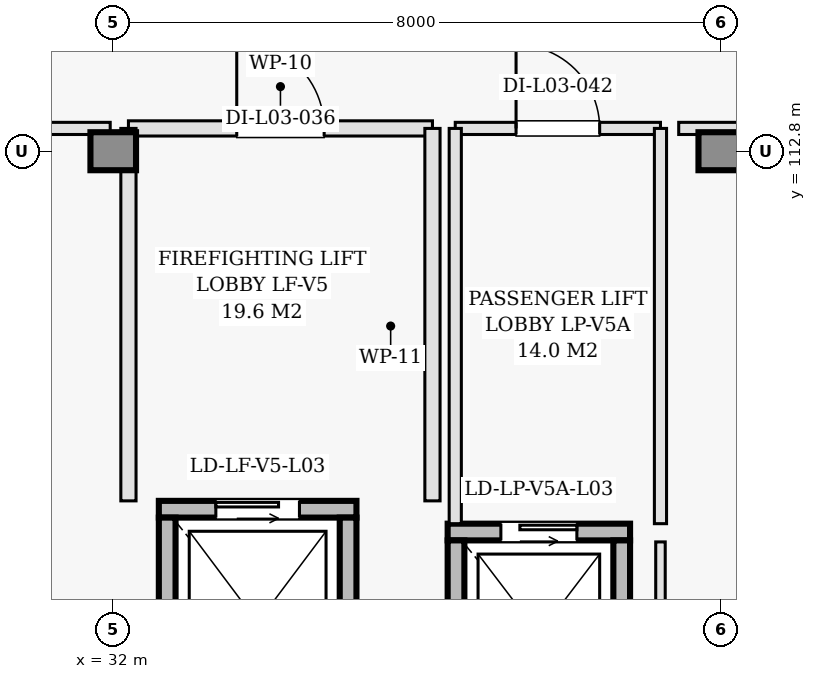
"""IFC4 building model, lengths in metres.
Left out: names, types, materials, properties, quantities, classifications, styles, units other than length and angle.
Written with IfcOpenShell. Run it as: python <this file> out.ifc"""

import sys

from ifc_helpers import new_model, si_unit, direction, frame, frame_2d, origin, origin_2d, place, context, subcontext, project, spatial, rectangle, extrude, element, fill, save


model = new_model("IFC4")
c1 = context("Model", 3, precision=1e-05, world=origin(), true_north=direction((0.0, 1.0)))
c2 = subcontext(c1, "Body", "Model", "MODEL_VIEW")
j1 = project(units=[si_unit("LENGTHUNIT", "METRE"), si_unit("PLANEANGLEUNIT", "RADIAN")], contexts=[c1])
p1 = place(None, origin())
s1 = spatial("IfcSite", under=j1, at=p1, CompositionType="ELEMENT")
p2 = place(p1, origin())
s2 = spatial("IfcBuilding", under=s1, at=p2, CompositionType="ELEMENT")
p3 = place(p2, frame((0.0, 0.0, 13.8)))
s3 = spatial("IfcBuildingStorey", under=s2, at=p3, CompositionType="ELEMENT", Elevation=13.8)
for number, where, z_axis, x_axis in (
    (1, (32.0, 112.8, 0.0), (0.0, 0.0, 1.0), (1.0, 0.0, 0.0)),
    (2, (40.0, 112.8, 0.0), (0.0, 0.0, 1.0), (1.0, 0.0, 0.0)),
):
    element("IfcColumn", number, at=place(p3, frame(where, z_axis=z_axis, x_axis=x_axis)), inside=s3, PredefinedType="COLUMN", context=c2, shape_type="SweptSolid", body=[
        extrude(rectangle(XDim=0.5, YDim=0.5, at=origin_2d()), origin(), (0.0, 0.0, 1.0), 4.2),
    ])
p4 = place(p3, frame((32.6, 108.09, 0.0), z_axis=(0.0, 0.0, 1.0), x_axis=(1.0, 0.0, 0.0)))
e3 = element("IfcWall", 3, at=p4, inside=s3, PredefinedType="SHEAR", context=c2, shape_type="SweptSolid", body=[
    extrude(rectangle(XDim=2.6, YDim=0.22, at=frame_2d((1.3, 0.0))), origin(), (0.0, 0.0, 1.0), 3.96),
])
p5 = place(p4, frame((0.75, 0.0, 0.0)))
e4 = element("IfcOpeningElement", 4, at=p5, cuts=e3, PredefinedType="OPENING", context=c2, shape_type="SweptSolid", body=[
    extrude(rectangle(XDim=1.1, YDim=2.15, at=frame_2d((0.55, 1.075))), frame((0.0, 0.12, 0.0), z_axis=(0.0, -1.0, 0.0), x_axis=(1.0, 0.0, 0.0)), (0.0, 0.0, 1.0), 0.24),
])
for number, where, z_axis, x_axis in (
    (5, (32.71, 105.22, 0.0), (0.0, 0.0, 1.0), (0.0, 1.0, 0.0)),
    (6, (35.09, 105.22, 0.0), (0.0, 0.0, 1.0), (0.0, 1.0, 0.0)),
):
    element("IfcWall", number, at=place(p3, frame(where, z_axis=z_axis, x_axis=x_axis)), inside=s3, PredefinedType="SHEAR", context=c2, shape_type="SweptSolid", body=[
        extrude(rectangle(XDim=2.76, YDim=0.22, at=frame_2d((1.38, 0.0))), origin(), (0.0, 0.0, 1.0), 3.96),
    ])
p6 = place(p3, frame((32.2, 113.1, 0.0), z_axis=(0.0, 0.0, 1.0), x_axis=(1.0, 0.0, 0.0)))
e7 = element("IfcWall", 7, at=p6, inside=s3, PredefinedType="PARTITIONING", context=c2, shape_type="SweptSolid", body=[
    extrude(rectangle(XDim=4.0, YDim=0.2, at=frame_2d((2.0, 0.0))), origin(), (0.0, 0.0, 1.0), 3.195),
])
p7 = place(p6, frame((1.425, 0.0, 0.0)))
e8 = element("IfcOpeningElement", 8, at=p7, cuts=e7, PredefinedType="OPENING", context=c2, shape_type="SweptSolid", body=[
    extrude(rectangle(XDim=1.15, YDim=2.15, at=frame_2d((0.575, 1.075))), frame((0.0, 0.11, 0.0), z_axis=(0.0, -1.0, 0.0), x_axis=(1.0, 0.0, 0.0)), (0.0, 0.0, 1.0), 0.22),
])
for number, where, z_axis, x_axis in (
    (9, (32.2, 108.2, 0.0), (0.0, 0.0, 1.0), (0.0, 1.0, 0.0)),
    (10, (36.2, 108.2, 0.0), (0.0, 0.0, 1.0), (0.0, 1.0, 0.0)),
):
    element("IfcWall", number, at=place(p3, frame(where, z_axis=z_axis, x_axis=x_axis)), inside=s3, PredefinedType="PARTITIONING", context=c2, shape_type="SweptSolid", body=[
        extrude(rectangle(XDim=4.9, YDim=0.2, at=frame_2d((2.45, 0.0))), origin(), (0.0, 0.0, 1.0), 3.195),
    ])
p8 = place(p3, frame((36.4, 107.79, 0.0), z_axis=(0.0, 0.0, 1.0), x_axis=(1.0, 0.0, 0.0)))
e11 = element("IfcWall", 11, at=p8, inside=s3, PredefinedType="SHEAR", context=c2, shape_type="SweptSolid", body=[
    extrude(rectangle(XDim=2.4, YDim=0.22, at=frame_2d((1.2, 0.0))), origin(), (0.0, 0.0, 1.0), 3.96),
])
p9 = place(p8, frame((0.7, 0.0, 0.0)))
e12 = element("IfcOpeningElement", 12, at=p9, cuts=e11, PredefinedType="OPENING", context=c2, shape_type="SweptSolid", body=[
    extrude(rectangle(XDim=1.0, YDim=2.15, at=frame_2d((0.5, 1.075))), frame((0.0, 0.12, 0.0), z_axis=(0.0, -1.0, 0.0), x_axis=(1.0, 0.0, 0.0)), (0.0, 0.0, 1.0), 0.24),
])
for number, where, z_axis, x_axis in (
    (13, (36.51, 105.22, 0.0), (0.0, 0.0, 1.0), (0.0, 1.0, 0.0)),
    (14, (38.69, 105.22, 0.0), (0.0, 0.0, 1.0), (0.0, 1.0, 0.0)),
):
    element("IfcWall", number, at=place(p3, frame(where, z_axis=z_axis, x_axis=x_axis)), inside=s3, PredefinedType="SHEAR", context=c2, shape_type="SweptSolid", body=[
        extrude(rectangle(XDim=2.46, YDim=0.22, at=frame_2d((1.23, 0.0))), origin(), (0.0, 0.0, 1.0), 3.96),
    ])
p10 = place(p3, frame((36.5, 113.1, 0.0), z_axis=(0.0, 0.0, 1.0), x_axis=(1.0, 0.0, 0.0)))
e15 = element("IfcWall", 15, at=p10, inside=s3, PredefinedType="PARTITIONING", context=c2, shape_type="SweptSolid", body=[
    extrude(rectangle(XDim=2.7, YDim=0.16, at=frame_2d((1.35, 0.0))), origin(), (0.0, 0.0, 1.0), 3.195),
])
p11 = place(p10, frame((0.8, 0.0, 0.0)))
e16 = element("IfcOpeningElement", 16, at=p11, cuts=e15, PredefinedType="OPENING", context=c2, shape_type="SweptSolid", body=[
    extrude(rectangle(XDim=1.1, YDim=2.15, at=frame_2d((0.55, 1.075))), frame((0.0, 0.09, 0.0), z_axis=(0.0, -1.0, 0.0), x_axis=(1.0, 0.0, 0.0)), (0.0, 0.0, 1.0), 0.18),
])
for number, where, z_axis, x_axis in (
    (17, (36.5, 107.9, 0.0), (0.0, 0.0, 1.0), (0.0, 1.0, 0.0)),
    (18, (39.2, 107.9, 0.0), (0.0, 0.0, 1.0), (0.0, 1.0, 0.0)),
):
    element("IfcWall", number, at=place(p3, frame(where, z_axis=z_axis, x_axis=x_axis)), inside=s3, PredefinedType="PARTITIONING", context=c2, shape_type="SweptSolid", body=[
        extrude(rectangle(XDim=5.2, YDim=0.16, at=frame_2d((2.6, 0.0))), origin(), (0.0, 0.0, 1.0), 3.195),
    ])
p12 = place(p3, frame((39.44, 113.1, 0.0), z_axis=(0.0, 0.0, 1.0), x_axis=(1.0, 0.0, 0.0)))
e19 = element("IfcWall", 19, at=p12, inside=s3, PredefinedType="PARTITIONING", context=c2, shape_type="SweptSolid", body=[
    extrude(rectangle(XDim=38.014, YDim=0.16, at=frame_2d((19.007, 0.0))), origin(), (0.0, 0.0, 1.0), 3.045),
])
p13 = place(p3, frame((39.2, 95.105, 0.0), z_axis=(0.0, 0.0, 1.0), x_axis=(0.0, 1.0, 0.0)))
e20 = element("IfcWall", 20, at=p13, inside=s3, PredefinedType="PARTITIONING", context=c2, shape_type="SweptSolid", body=[
    extrude(rectangle(XDim=12.555, YDim=0.125, at=frame_2d((6.277, 0.0))), origin(), (0.0, 0.0, 1.0), 3.195),
])
p14 = place(p3, frame((29.087, 113.1, 0.0), z_axis=(0.0, 0.0, 1.0), x_axis=(1.0, 0.0, 0.0)))
e21 = element("IfcWall", 21, at=p14, inside=s3, PredefinedType="PARTITIONING", context=c2, shape_type="SweptSolid", body=[
    extrude(rectangle(XDim=2.873, YDim=0.16, at=frame_2d((1.437, 0.0))), origin(), (0.0, 0.0, 1.0), 3.295),
])
p15 = place(p5, origin())
e22 = element("IfcDoor", 22, at=p15, inside=s3, OperationType="SLIDING_TO_LEFT", PredefinedType="DOOR", context=c2, shape_type="SweptSolid", body=[
    extrude(rectangle(XDim=1.1, YDim=2.15, at=frame_2d((0.55, 1.075))), frame((0.0, 0.025, 0.0), z_axis=(0.0, -1.0, 0.0), x_axis=(1.0, 0.0, 0.0)), (0.0, 0.0, 1.0), 0.05),
])
fill(e4, e22)
p16 = place(p7, origin())
e23 = element("IfcDoor", 23, at=p16, inside=s3, OperationType="SINGLE_SWING_LEFT", PredefinedType="DOOR", context=c2, shape_type="SweptSolid", body=[
    extrude(rectangle(XDim=1.15, YDim=2.15, at=frame_2d((0.575, 1.075))), frame((0.0, 0.025, 0.0), z_axis=(0.0, -1.0, 0.0), x_axis=(1.0, 0.0, 0.0)), (0.0, 0.0, 1.0), 0.05),
])
fill(e8, e23)
p17 = place(p9, origin())
e24 = element("IfcDoor", 24, at=p17, inside=s3, OperationType="SLIDING_TO_RIGHT", PredefinedType="DOOR", context=c2, shape_type="SweptSolid", body=[
    extrude(rectangle(XDim=1.0, YDim=2.15, at=frame_2d((0.5, 1.075))), frame((0.0, 0.025, 0.0), z_axis=(0.0, -1.0, 0.0), x_axis=(1.0, 0.0, 0.0)), (0.0, 0.0, 1.0), 0.05),
])
fill(e12, e24)
p18 = place(p11, origin())
e25 = element("IfcDoor", 25, at=p18, inside=s3, OperationType="SINGLE_SWING_LEFT", PredefinedType="DOOR", context=c2, shape_type="SweptSolid", body=[
    extrude(rectangle(XDim=1.1, YDim=2.15, at=frame_2d((0.55, 1.075))), frame((0.0, 0.025, 0.0), z_axis=(0.0, -1.0, 0.0), x_axis=(1.0, 0.0, 0.0)), (0.0, 0.0, 1.0), 0.05),
])
fill(e16, e25)
save(model, sys.argv[1])
